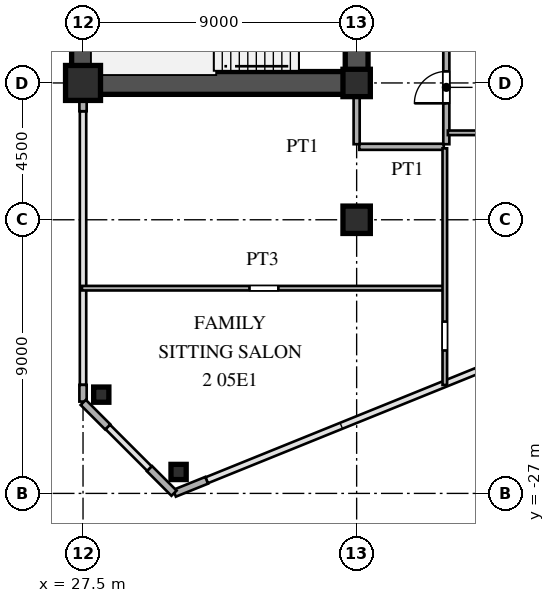
"""IFC4 building model, lengths in metres.
Left out: names, types, materials, properties, quantities, classifications, styles, units other than length and angle.
Written with IfcOpenShell. Run it as: python <this file> out.ifc"""

import sys

from ifc_helpers import new_model, si_unit, direction, frame, frame_2d, origin, origin_2d, place, context, subcontext, project, spatial, rectangle, hollow_rectangle, i_section, extrude, source, transform, mapped, element, fill, save


model = new_model("IFC4")
c1 = context("Model", 3, precision=1e-05, world=origin(), true_north=direction((0.0, 1.0)))
c2 = subcontext(c1, "Body", "Model", "MODEL_VIEW")
j1 = project(units=[si_unit("LENGTHUNIT", "METRE"), si_unit("PLANEANGLEUNIT", "RADIAN")], contexts=[c1])
p1 = place(None, origin())
s1 = spatial("IfcSite", under=j1, at=p1, CompositionType="ELEMENT")
p2 = place(p1, origin())
s2 = spatial("IfcBuilding", under=s1, at=p2, CompositionType="ELEMENT")
p3 = place(p2, frame((0.0, 0.0, 22.5)))
s3 = spatial("IfcBuildingStorey", under=s2, at=p3, CompositionType="ELEMENT", Elevation=22.5)
m1 = source(origin(), c2, "Body", "SweptSolid", [
    extrude(hollow_rectangle(XDim=1.15, YDim=1.15, WallThickness=0.048, at=origin_2d()), origin(), (0.0, 0.0, 1.0), 3.6),
])
p4 = place(p3, frame((27.5, -13.5, 0.0), z_axis=(0.0, 0.0, 1.0), x_axis=(1.0, 0.0, 0.0)))
e1 = element("IfcColumn", 1, at=p4, inside=s3, PredefinedType="COLUMN", context=c2, shape_type="MappedRepresentation", body=[
    mapped(m1, transform((0.0, 0.0, 0.0), scale=1.0)),
])
m2 = source(origin(), c2, "Body", "SweptSolid", [
    extrude(i_section(OverallWidth=0.9, OverallDepth=0.9, WebThickness=0.036, FlangeThickness=0.055, at=origin_2d()), origin(), (0.0, 0.0, 1.0), 3.6),
])
for number, where, z_axis, x_axis in (
    (2, (36.5, -18.0, 0.0), (0.0, 0.0, 1.0), (1.0, 0.0, 0.0)),
    (3, (36.5, -13.5, 0.0), (0.0, 0.0, 1.0), (1.0, 0.0, 0.0)),
):
    element("IfcColumn", number, at=place(p3, frame(where, z_axis=z_axis, x_axis=x_axis)), inside=s3, PredefinedType="COLUMN", context=c2, shape_type="MappedRepresentation", body=[
        mapped(m2, transform((0.0, 0.0, 0.0), scale=1.0)),
    ])
m3 = source(origin(), c2, "Body", "SweptSolid", [
    extrude(hollow_rectangle(XDim=0.5, YDim=0.5, WallThickness=0.02, at=origin_2d()), origin(), (0.0, 0.0, 1.0), 3.6),
])
for number, where, z_axis, x_axis in (
    (4, (30.643, -26.295, 0.0), (0.0, 0.0, 1.0), (1.0, 0.0, 0.0)),
    (5, (28.1, -23.751, 0.0), (0.0, 0.0, 1.0), (1.0, 0.0, 0.0)),
):
    element("IfcColumn", number, at=place(p3, frame(where, z_axis=z_axis, x_axis=x_axis)), inside=s3, PredefinedType="COLUMN", context=c2, shape_type="MappedRepresentation", body=[
        mapped(m3, transform((0.0, 0.0, 0.0), scale=1.0)),
    ])
p5 = place(p3, frame((30.509, -26.996, 0.0), z_axis=(0.0, 0.0, 1.0), x_axis=(0.927007103665, 0.375043770452, 0.0)))
e6 = element("IfcWall", 6, at=p5, inside=s3, PredefinedType="SOLIDWALL", context=c2, shape_type="SweptSolid", body=[
    extrude(rectangle(XDim=1.14, YDim=0.24, at=frame_2d((0.57, 0.0))), origin(), (0.0, 0.0, 1.0), 3.38),
])
p6 = place(p3, frame((27.5, -23.98, 0.0), z_axis=(0.0, 0.0, 1.0), x_axis=(0.0, 1.0, 0.0)))
e7 = element("IfcWall", 7, at=p6, inside=s3, PredefinedType="SOLIDWALL", context=c2, shape_type="SweptSolid", body=[
    extrude(rectangle(XDim=0.55, YDim=0.24, at=frame_2d((0.275, 0.0))), origin(), (0.0, 0.0, 1.0), 3.38),
])
p7 = place(p3, frame((27.5, -14.43, 0.0), z_axis=(0.0, 0.0, 1.0), x_axis=(0.0, 1.0, 0.0)))
e8 = element("IfcWall", 8, at=p7, inside=s3, PredefinedType="SOLIDWALL", context=c2, shape_type="SweptSolid", body=[
    extrude(rectangle(XDim=0.55, YDim=0.24, at=frame_2d((0.275, 0.0))), origin(), (0.0, 0.0, 1.0), 2.88),
])
for number, where, z_axis, x_axis in (
    (9, (27.507, -24.007, 0.0), (0.0, 0.0, 1.0), (0.707, -0.707, 0.0)),
    (10, (29.687, -26.187, 0.0), (0.0, 0.0, 1.0), (0.707, -0.707, 0.0)),
):
    element("IfcWall", number, at=place(p3, frame(where, z_axis=z_axis, x_axis=x_axis)), inside=s3, PredefinedType="SOLIDWALL", context=c2, shape_type="SweptSolid", body=[
        extrude(rectangle(XDim=1.14, YDim=0.24, at=frame_2d((0.57, 0.0))), origin(), (0.0, 0.0, 1.0), 3.38),
    ])
p8 = place(p3, frame((27.5, -13.5, 0.0), z_axis=(0.0, 0.0, 1.0), x_axis=(0.0, 1.0, 0.0)))
e11 = element("IfcWall", 11, at=p8, inside=s3, PredefinedType="SHEAR", context=c2, shape_type="SweptSolid", body=[
    extrude(rectangle(XDim=12.2, YDim=0.75, at=frame_2d((6.1, 0.0))), origin(), (0.0, 0.0, 1.0), 3.38),
])
p9 = place(p3, frame((27.5, -13.5, 0.0), z_axis=(0.0, 0.0, 1.0), x_axis=(1.0, 0.0, 0.0)))
e12 = element("IfcWall", 12, at=p9, inside=s3, PredefinedType="SHEAR", context=c2, shape_type="SweptSolid", body=[
    extrude(rectangle(XDim=9.0, YDim=0.75, at=frame_2d((4.5, 0.0))), origin(), (0.0, 0.0, 1.0), 3.38),
])
p10 = place(p3, frame((36.5, -13.65, 0.0), z_axis=(0.0, 0.0, 1.0), x_axis=(0.0, 1.0, 0.0)))
e13 = element("IfcWall", 13, at=p10, inside=s3, PredefinedType="SHEAR", context=c2, shape_type="SweptSolid", body=[
    extrude(rectangle(XDim=7.15, YDim=0.75, at=frame_2d((3.575, 0.0))), origin(), (0.0, 0.0, 1.0), 3.38),
])
p11 = place(p10, frame((4.675, 0.0, 0.0)))
e14 = element("IfcOpeningElement", 14, at=p11, cuts=e13, PredefinedType="OPENING", context=c2, shape_type="SweptSolid", body=[
    extrude(rectangle(XDim=1.15, YDim=2.2, at=frame_2d((0.575, 1.1))), frame((0.0, 0.385, 0.0), z_axis=(0.0, -1.0, 0.0), x_axis=(1.0, 0.0, 0.0)), (0.0, 0.0, 1.0), 0.77),
])
p12 = place(p3, frame((27.465, -20.25, 0.0), z_axis=(0.0, 0.0, 1.0), x_axis=(1.0, 0.0, 0.0)))
e15 = element("IfcWall", 15, at=p12, inside=s3, PredefinedType="PARTITIONING", context=c2, shape_type="SweptSolid", body=[
    extrude(rectangle(XDim=11.885, YDim=0.15, at=frame_2d((5.942, 0.0))), origin(), (0.0, 0.0, 1.0), 3.38),
])
p13 = place(p12, frame((5.51, 0.0, 0.0)))
e16 = element("IfcOpeningElement", 16, at=p13, cuts=e15, PredefinedType="OPENING", context=c2, shape_type="SweptSolid", body=[
    extrude(rectangle(XDim=0.95, YDim=2.15, at=frame_2d((0.475, 1.075))), frame((0.0, 0.085, 0.0), z_axis=(0.0, -1.0, 0.0), x_axis=(1.0, 0.0, 0.0)), (0.0, 0.0, 1.0), 0.17),
])
p14 = place(p3, frame((36.585, -15.6, 0.0), z_axis=(0.0, 0.0, 1.0), x_axis=(1.0, 0.0, 0.0)))
e17 = element("IfcWall", 17, at=p14, inside=s3, PredefinedType="PARTITIONING", context=c2, shape_type="SweptSolid", body=[
    extrude(rectangle(XDim=2.78, YDim=0.2, at=frame_2d((1.39, 0.0))), origin(), (0.0, 0.0, 1.0), 3.38),
])
p15 = place(p3, frame((39.5, -15.14, 0.0), z_axis=(0.0, 0.0, 1.0), x_axis=(1.0, 0.0, 0.0)))
e18 = element("IfcWall", 18, at=p15, inside=s3, PredefinedType="PARTITIONING", context=c2, shape_type="SweptSolid", body=[
    extrude(rectangle(XDim=4.05, YDim=0.15, at=frame_2d((2.025, 0.0))), origin(), (0.0, 0.0, 1.0), 3.38),
])
p16 = place(p15, frame((1.55, 0.0, 0.0)))
e19 = element("IfcOpeningElement", 19, at=p16, cuts=e18, PredefinedType="OPENING", context=c2, shape_type="SweptSolid", body=[
    extrude(rectangle(XDim=0.95, YDim=2.15, at=frame_2d((0.475, 1.075))), frame((0.0, 0.085, 0.0), z_axis=(0.0, -1.0, 0.0), x_axis=(1.0, 0.0, 0.0)), (0.0, 0.0, 1.0), 0.17),
])
p17 = place(p3, frame((36.5, -15.515, 0.0), z_axis=(0.0, 0.0, 1.0), x_axis=(0.0, 1.0, 0.0)))
e20 = element("IfcWall", 20, at=p17, inside=s3, PredefinedType="PARTITIONING", context=c2, shape_type="SweptSolid", body=[
    extrude(rectangle(XDim=1.635, YDim=0.2, at=frame_2d((0.817, 0.0))), origin(), (0.0, 0.0, 1.0), 2.68),
])
p18 = place(p3, frame((39.4, -23.433, 0.0), z_axis=(0.0, 0.0, 1.0), x_axis=(0.0, 1.0, 0.0)))
e21 = element("IfcWall", 21, at=p18, inside=s3, PredefinedType="PARTITIONING", context=c2, shape_type="SweptSolid", body=[
    extrude(rectangle(XDim=7.783, YDim=0.15, at=frame_2d((3.892, 0.0))), origin(), (0.0, 0.0, 1.0), 3.38),
])
p19 = place(p18, frame((1.134, 0.0, 0.0)))
e22 = element("IfcOpeningElement", 22, at=p19, cuts=e21, PredefinedType="OPENING", context=c2, shape_type="SweptSolid", body=[
    extrude(rectangle(XDim=0.95, YDim=2.15, at=frame_2d((0.475, 1.075))), frame((0.0, 0.085, 0.0), z_axis=(0.0, -1.0, 0.0), x_axis=(1.0, 0.0, 0.0)), (0.0, 0.0, 1.0), 0.17),
])
p20 = place(p3, frame((39.45, -15.515, 0.0), z_axis=(0.0, 0.0, 1.0), x_axis=(0.0, 1.0, 0.0)))
e23 = element("IfcWall", 23, at=p20, inside=s3, PredefinedType="PARTITIONING", context=c2, shape_type="SweptSolid", body=[
    extrude(rectangle(XDim=31.03, YDim=0.2, at=frame_2d((15.515, 0.0))), origin(), (0.0, 0.0, 1.0), 3.38),
])
p21 = place(p20, frame((1.345, 0.0, 0.0)))
e24 = element("IfcOpeningElement", 24, at=p21, cuts=e23, PredefinedType="OPENING", context=c2, shape_type="SweptSolid", body=[
    extrude(rectangle(XDim=1.05, YDim=2.25, at=frame_2d((0.525, 1.125))), frame((0.0, 0.11, 0.0), z_axis=(0.0, -1.0, 0.0), x_axis=(1.0, 0.0, 0.0)), (0.0, 0.0, 1.0), 0.22),
])
p22 = place(p20, frame((12.28, 0.0, 0.0)))
e25 = element("IfcOpeningElement", 25, at=p22, cuts=e23, PredefinedType="OPENING", context=c2, shape_type="SweptSolid", body=[
    extrude(rectangle(XDim=1.05, YDim=2.25, at=frame_2d((0.525, 1.125))), frame((0.0, 0.11, 0.0), z_axis=(0.0, -1.0, 0.0), x_axis=(1.0, 0.0, 0.0)), (0.0, 0.0, 1.0), 0.22),
])
p23 = place(p20, frame((25.067, 0.0, 0.0)))
e26 = element("IfcOpeningElement", 26, at=p23, cuts=e23, PredefinedType="OPENING", context=c2, shape_type="SweptSolid", body=[
    extrude(rectangle(XDim=1.05, YDim=2.25, at=frame_2d((0.525, 1.125))), frame((0.0, 0.11, 0.0), z_axis=(0.0, -1.0, 0.0), x_axis=(1.0, 0.0, 0.0)), (0.0, 0.0, 1.0), 0.22),
])
m4 = source(origin(), c2, "Body", "SweptSolid", [
    extrude(rectangle(XDim=1.05, YDim=2.25, at=frame_2d((0.525, 1.125))), frame((0.0, 0.025, 0.0), z_axis=(0.0, -1.0, 0.0), x_axis=(1.0, 0.0, 0.0)), (0.0, 0.0, 1.0), 0.05),
])
p24 = place(p21, origin())
e27 = element("IfcDoor", 27, at=p24, inside=s3, OperationType="SINGLE_SWING_LEFT", PredefinedType="DOOR", context=c2, shape_type="MappedRepresentation", body=[
    mapped(m4, transform((0.0, 0.0, 0.0), scale=1.0)),
])
fill(e24, e27)
save(model, sys.argv[1])
